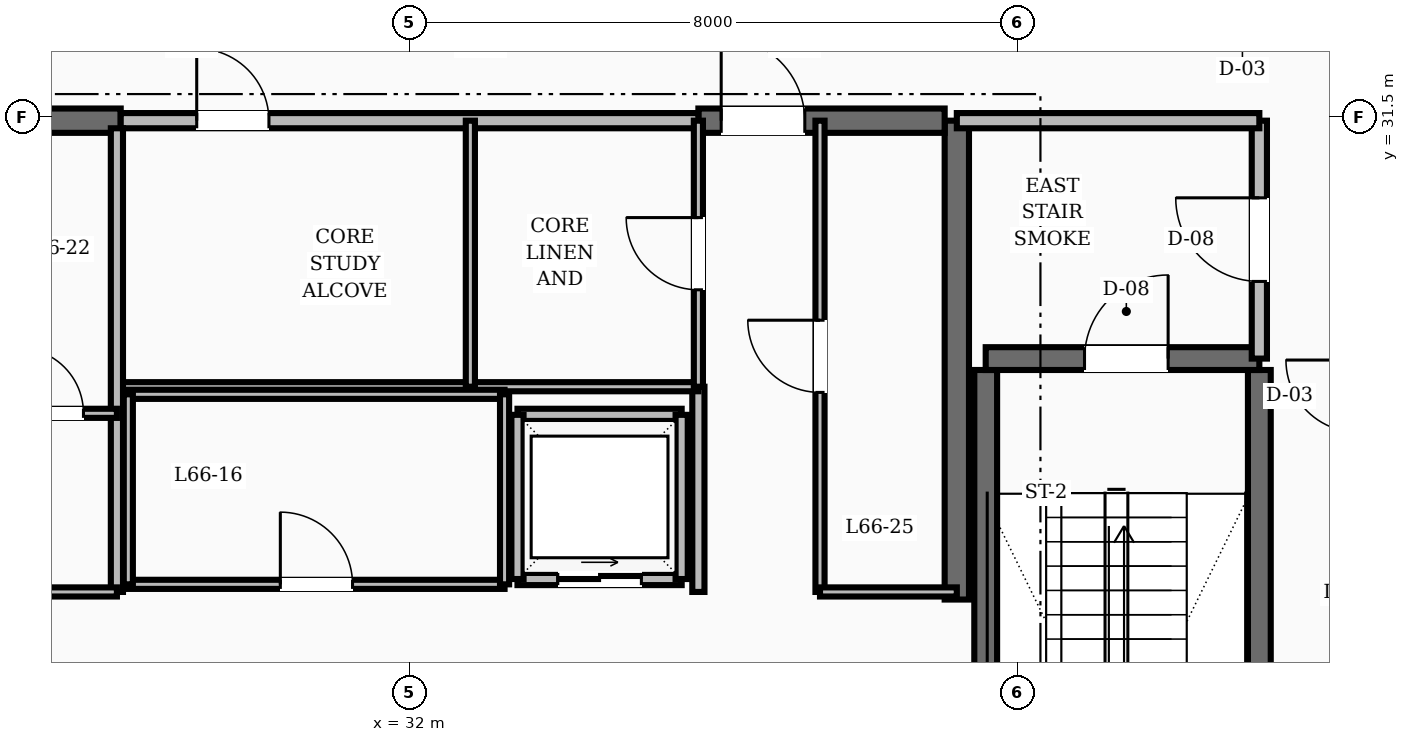
"""IFC4 building model, lengths in metres.
Left out: names, types, materials, properties, quantities, classifications, styles, units other than length and angle.
Written with IfcOpenShell. Run it as: python <this file> out.ifc"""

import sys

from ifc_helpers import new_model, si_unit, direction, frame, frame_2d, origin, place, context, subcontext, project, spatial, rectangle, extrude, element, fill, save


model = new_model("IFC4")
c1 = context("Model", 3, precision=1e-05, world=origin(), true_north=direction((0.0, 1.0)))
c2 = subcontext(c1, "Body", "Model", "MODEL_VIEW")
j1 = project(units=[si_unit("LENGTHUNIT", "METRE"), si_unit("PLANEANGLEUNIT", "RADIAN")], contexts=[c1])
p1 = place(None, origin())
s1 = spatial("IfcSite", under=j1, at=p1, CompositionType="ELEMENT")
p2 = place(p1, origin())
s2 = spatial("IfcBuilding", under=s1, at=p2, CompositionType="ELEMENT")
p3 = place(p2, frame((0.0, 0.0, 254.4)))
s3 = spatial("IfcBuildingStorey", under=s2, at=p3, CompositionType="ELEMENT", Elevation=254.4)
p4 = place(p3, frame((39.2, 25.15, 0.0), z_axis=(0.0, 0.0, 1.0), x_axis=(0.0, 1.0, 0.0)))
e1 = element("IfcWall", 1, at=p4, inside=s3, PredefinedType="SHEAR", context=c2, shape_type="SweptSolid", body=[
    extrude(rectangle(XDim=6.3, YDim=0.32, at=frame_2d((3.15, 0.0))), origin(), (0.0, 0.0, 1.0), 3.6),
])
p5 = place(p3, frame((24.96, 31.45, 0.0), z_axis=(0.0, 0.0, 1.0), x_axis=(1.0, 0.0, 0.0)))
e2 = element("IfcWall", 2, at=p5, inside=s3, PredefinedType="SHEAR", context=c2, shape_type="SweptSolid", body=[
    extrude(rectangle(XDim=3.24, YDim=0.32, at=frame_2d((1.62, 0.0))), origin(), (0.0, 0.0, 1.0), 3.6),
])
p6 = place(p3, frame((35.8, 31.45, 0.0), z_axis=(0.0, 0.0, 1.0), x_axis=(1.0, 0.0, 0.0)))
e3 = element("IfcWall", 3, at=p6, inside=s3, PredefinedType="SHEAR", context=c2, shape_type="SweptSolid", body=[
    extrude(rectangle(XDim=3.24, YDim=0.32, at=frame_2d((1.62, 0.0))), origin(), (0.0, 0.0, 1.0), 3.6),
])
p7 = place(p6, frame((0.3, 0.0, 0.0)))
e4 = element("IfcOpeningElement", 4, at=p7, cuts=e3, PredefinedType="OPENING", context=c2, shape_type="SweptSolid", body=[
    extrude(rectangle(XDim=1.1, YDim=2.1, at=frame_2d((0.55, 1.05))), frame((0.0, 0.17, 0.0), z_axis=(0.0, -1.0, 0.0), x_axis=(1.0, 0.0, 0.0)), (0.0, 0.0, 1.0), 0.34),
])
for number, where, z_axis, x_axis in (
    (5, (43.18, 19.43, 0.0), (0.0, 0.0, 1.0), (0.0, 1.0, 0.0)),
    (6, (39.58, 19.43, 0.0), (0.0, 0.0, 1.0), (0.0, 1.0, 0.0)),
):
    element("IfcWall", number, at=place(p3, frame(where, z_axis=z_axis, x_axis=x_axis)), inside=s3, PredefinedType="SHEAR", context=c2, shape_type="SweptSolid", body=[
        extrude(rectangle(XDim=8.74, YDim=0.3, at=frame_2d((4.37, 0.0))), origin(), (0.0, 0.0, 1.0), 3.6),
    ])
p8 = place(p3, frame((39.58, 28.32, 0.0), z_axis=(0.0, 0.0, 1.0), x_axis=(1.0, 0.0, 0.0)))
e7 = element("IfcWall", 7, at=p8, inside=s3, PredefinedType="SHEAR", context=c2, shape_type="SweptSolid", body=[
    extrude(rectangle(XDim=3.6, YDim=0.3, at=frame_2d((1.8, 0.0))), origin(), (0.0, 0.0, 1.0), 3.6),
])
p9 = place(p8, frame((1.3, 0.0, 0.0)))
e8 = element("IfcOpeningElement", 8, at=p9, cuts=e7, PredefinedType="OPENING", context=c2, shape_type="SweptSolid", body=[
    extrude(rectangle(XDim=1.1, YDim=2.1, at=frame_2d((0.55, 1.05))), frame((0.0, 0.16, 0.0), z_axis=(0.0, -1.0, 0.0), x_axis=(1.0, 0.0, 0.0)), (0.0, 0.0, 1.0), 0.32),
])
p10 = place(p3, frame((43.18, 28.32, 0.0), z_axis=(0.0, 0.0, 1.0), x_axis=(0.0, 1.0, 0.0)))
e9 = element("IfcWall", 9, at=p10, inside=s3, PredefinedType="SOLIDWALL", context=c2, shape_type="SweptSolid", body=[
    extrude(rectangle(XDim=3.13, YDim=0.2, at=frame_2d((1.565, 0.0))), origin(), (0.0, 0.0, 1.0), 2.87),
])
p11 = place(p10, frame((1.015, 0.0, 0.0)))
e10 = element("IfcOpeningElement", 10, at=p11, cuts=e9, PredefinedType="OPENING", context=c2, shape_type="SweptSolid", body=[
    extrude(rectangle(XDim=1.1, YDim=2.1, at=frame_2d((0.55, 1.05))), frame((0.0, 0.11, 0.0), z_axis=(0.0, -1.0, 0.0), x_axis=(1.0, 0.0, 0.0)), (0.0, 0.0, 1.0), 0.22),
])
p12 = place(p3, frame((39.2, 31.45, 0.0), z_axis=(0.0, 0.0, 1.0), x_axis=(1.0, 0.0, 0.0)))
e11 = element("IfcWall", 11, at=p12, inside=s3, PredefinedType="SOLIDWALL", context=c2, shape_type="SweptSolid", body=[
    extrude(rectangle(XDim=3.98, YDim=0.2, at=frame_2d((1.99, 0.0))), origin(), (0.0, 0.0, 1.0), 2.87),
])
p13 = place(p3, frame((35.8, 25.25, 0.0), z_axis=(0.0, 0.0, 1.0), x_axis=(0.0, 1.0, 0.0)))
e12 = element("IfcWall", 12, at=p13, inside=s3, PredefinedType="SOLIDWALL", context=c2, shape_type="SweptSolid", body=[
    extrude(rectangle(XDim=2.7, YDim=0.16, at=frame_2d((1.35, 0.0))), origin(), (0.0, 0.0, 1.0), 2.87),
])
p14 = place(p3, frame((33.42, 25.42, 0.0), z_axis=(0.0, 0.0, 1.0), x_axis=(1.0, 0.0, 0.0)))
e13 = element("IfcWall", 13, at=p14, inside=s3, PredefinedType="SOLIDWALL", context=c2, shape_type="SweptSolid", body=[
    extrude(rectangle(XDim=2.16, YDim=0.16, at=frame_2d((1.08, 0.0))), origin(), (0.0, 0.0, 1.0), 2.87),
])
p15 = place(p14, frame((0.53, 0.0, 0.0)))
e14 = element("IfcOpeningElement", 14, at=p15, cuts=e13, PredefinedType="OPENING", context=c2, shape_type="SweptSolid", body=[
    extrude(rectangle(XDim=1.1, YDim=2.15, at=frame_2d((0.55, 1.075))), frame((0.0, 0.09, 0.0), z_axis=(0.0, -1.0, 0.0), x_axis=(1.0, 0.0, 0.0)), (0.0, 0.0, 1.0), 0.18),
])
for number, where, z_axis, x_axis in (
    (15, (33.42, 27.58, 0.0), (0.0, 0.0, 1.0), (1.0, 0.0, 0.0)),
    (16, (33.42, 25.42, 0.0), (0.0, 0.0, 1.0), (0.0, 1.0, 0.0)),
    (17, (35.58, 25.42, 0.0), (0.0, 0.0, 1.0), (0.0, 1.0, 0.0)),
):
    element("IfcWall", number, at=place(p3, frame(where, z_axis=z_axis, x_axis=x_axis)), inside=s3, PredefinedType="SOLIDWALL", context=c2, shape_type="SweptSolid", body=[
        extrude(rectangle(XDim=2.16, YDim=0.16, at=frame_2d((1.08, 0.0))), origin(), (0.0, 0.0, 1.0), 2.87),
    ])
p16 = place(p3, frame((28.2, 31.45, 0.0), z_axis=(0.0, 0.0, 1.0), x_axis=(1.0, 0.0, 0.0)))
e18 = element("IfcWall", 18, at=p16, inside=s3, PredefinedType="SOLIDWALL", context=c2, shape_type="SweptSolid", body=[
    extrude(rectangle(XDim=7.6, YDim=0.2, at=frame_2d((3.8, 0.0))), origin(), (0.0, 0.0, 1.0), 2.87),
])
p17 = place(p16, frame((1.0, 0.0, 0.0)))
e19 = element("IfcOpeningElement", 19, at=p17, cuts=e18, PredefinedType="OPENING", context=c2, shape_type="SweptSolid", body=[
    extrude(rectangle(XDim=0.95, YDim=2.1, at=frame_2d((0.475, 1.05))), frame((0.0, 0.11, 0.0), z_axis=(0.0, -1.0, 0.0), x_axis=(1.0, 0.0, 0.0)), (0.0, 0.0, 1.0), 0.22),
])
p18 = place(p3, frame((28.2, 27.95, 0.0), z_axis=(0.0, 0.0, 1.0), x_axis=(1.0, 0.0, 0.0)))
e20 = element("IfcWall", 20, at=p18, inside=s3, PredefinedType="PARTITIONING", context=c2, shape_type="SweptSolid", body=[
    extrude(rectangle(XDim=7.6, YDim=0.12, at=frame_2d((3.8, 0.0))), origin(), (0.0, 0.0, 1.0), 2.87),
])
p19 = place(p3, frame((35.8, 27.95, 0.0), z_axis=(0.0, 0.0, 1.0), x_axis=(0.0, 1.0, 0.0)))
e21 = element("IfcWall", 21, at=p19, inside=s3, PredefinedType="PARTITIONING", context=c2, shape_type="SweptSolid", body=[
    extrude(rectangle(XDim=3.5, YDim=0.12, at=frame_2d((1.75, 0.0))), origin(), (0.0, 0.0, 1.0), 2.87),
])
p20 = place(p19, frame((1.275, 0.0, 0.0)))
e22 = element("IfcOpeningElement", 22, at=p20, cuts=e21, PredefinedType="OPENING", context=c2, shape_type="SweptSolid", body=[
    extrude(rectangle(XDim=0.95, YDim=2.1, at=frame_2d((0.475, 1.05))), frame((0.0, 0.07, 0.0), z_axis=(0.0, -1.0, 0.0), x_axis=(1.0, 0.0, 0.0)), (0.0, 0.0, 1.0), 0.14),
])
p21 = place(p3, frame((32.8, 27.95, 0.0), z_axis=(0.0, 0.0, 1.0), x_axis=(0.0, 1.0, 0.0)))
e23 = element("IfcWall", 23, at=p21, inside=s3, PredefinedType="PARTITIONING", context=c2, shape_type="SweptSolid", body=[
    extrude(rectangle(XDim=3.5, YDim=0.12, at=frame_2d((1.75, 0.0))), origin(), (0.0, 0.0, 1.0), 2.87),
])
p22 = place(p3, frame((28.3, 25.35, 0.0), z_axis=(0.0, 0.0, 1.0), x_axis=(1.0, 0.0, 0.0)))
e24 = element("IfcWall", 24, at=p22, inside=s3, PredefinedType="PARTITIONING", context=c2, shape_type="SweptSolid", body=[
    extrude(rectangle(XDim=4.95, YDim=0.12, at=frame_2d((2.475, 0.0))), origin(), (0.0, 0.0, 1.0), 2.87),
])
p23 = place(p22, frame((2.0, 0.0, 0.0)))
e25 = element("IfcOpeningElement", 25, at=p23, cuts=e24, PredefinedType="OPENING", context=c2, shape_type="SweptSolid", body=[
    extrude(rectangle(XDim=0.95, YDim=2.1, at=frame_2d((0.475, 1.05))), frame((0.0, 0.07, 0.0), z_axis=(0.0, -1.0, 0.0), x_axis=(1.0, 0.0, 0.0)), (0.0, 0.0, 1.0), 0.14),
])
p24 = place(p3, frame((28.3, 27.85, 0.0), z_axis=(0.0, 0.0, 1.0), x_axis=(1.0, 0.0, 0.0)))
e26 = element("IfcWall", 26, at=p24, inside=s3, PredefinedType="PARTITIONING", context=c2, shape_type="SweptSolid", body=[
    extrude(rectangle(XDim=4.95, YDim=0.12, at=frame_2d((2.475, 0.0))), origin(), (0.0, 0.0, 1.0), 2.87),
])
for number, where, z_axis, x_axis in (
    (27, (28.3, 25.35, 0.0), (0.0, 0.0, 1.0), (0.0, 1.0, 0.0)),
    (28, (33.25, 25.35, 0.0), (0.0, 0.0, 1.0), (0.0, 1.0, 0.0)),
):
    element("IfcWall", number, at=place(p3, frame(where, z_axis=z_axis, x_axis=x_axis)), inside=s3, PredefinedType="PARTITIONING", context=c2, shape_type="SweptSolid", body=[
        extrude(rectangle(XDim=2.5, YDim=0.12, at=frame_2d((1.25, 0.0))), origin(), (0.0, 0.0, 1.0), 2.87),
    ])
p25 = place(p3, frame((28.15, 25.25, 0.0), z_axis=(0.0, 0.0, 1.0), x_axis=(0.0, 1.0, 0.0)))
e29 = element("IfcWall", 29, at=p25, inside=s3, PredefinedType="SOLIDWALL", context=c2, shape_type="SweptSolid", body=[
    extrude(rectangle(XDim=6.1, YDim=0.16, at=frame_2d((3.05, 0.0))), origin(), (0.0, 0.0, 1.0), 2.87),
])
p26 = place(p3, frame((24.95, 25.25, 0.0), z_axis=(0.0, 0.0, 1.0), x_axis=(1.0, 0.0, 0.0)))
e30 = element("IfcWall", 30, at=p26, inside=s3, PredefinedType="PARTITIONING", context=c2, shape_type="SweptSolid", body=[
    extrude(rectangle(XDim=3.2, YDim=0.12, at=frame_2d((1.6, 0.0))), origin(), (0.0, 0.0, 1.0), 2.87),
])
p27 = place(p26, frame((1.125, 0.0, 0.0)))
e31 = element("IfcOpeningElement", 31, at=p27, cuts=e30, PredefinedType="OPENING", context=c2, shape_type="SweptSolid", body=[
    extrude(rectangle(XDim=0.95, YDim=2.1, at=frame_2d((0.475, 1.05))), frame((0.0, 0.07, 0.0), z_axis=(0.0, -1.0, 0.0), x_axis=(1.0, 0.0, 0.0)), (0.0, 0.0, 1.0), 0.14),
])
p28 = place(p3, frame((37.4, 25.25, 0.0), z_axis=(0.0, 0.0, 1.0), x_axis=(0.0, 1.0, 0.0)))
e32 = element("IfcWall", 32, at=p28, inside=s3, PredefinedType="PARTITIONING", context=c2, shape_type="SweptSolid", body=[
    extrude(rectangle(XDim=6.2, YDim=0.12, at=frame_2d((3.1, 0.0))), origin(), (0.0, 0.0, 1.0), 2.87),
])
p29 = place(p28, frame((2.625, 0.0, 0.0)))
e33 = element("IfcOpeningElement", 33, at=p29, cuts=e32, PredefinedType="OPENING", context=c2, shape_type="SweptSolid", body=[
    extrude(rectangle(XDim=0.95, YDim=2.1, at=frame_2d((0.475, 1.05))), frame((0.0, 0.07, 0.0), z_axis=(0.0, -1.0, 0.0), x_axis=(1.0, 0.0, 0.0)), (0.0, 0.0, 1.0), 0.14),
])
p30 = place(p3, frame((37.4, 25.25, 0.0), z_axis=(0.0, 0.0, 1.0), x_axis=(1.0, 0.0, 0.0)))
e34 = element("IfcWall", 34, at=p30, inside=s3, PredefinedType="PARTITIONING", context=c2, shape_type="SweptSolid", body=[
    extrude(rectangle(XDim=1.8, YDim=0.12, at=frame_2d((0.9, 0.0))), origin(), (0.0, 0.0, 1.0), 2.87),
])
p31 = place(p3, frame((24.95, 27.6, 0.0), z_axis=(0.0, 0.0, 1.0), x_axis=(1.0, 0.0, 0.0)))
e35 = element("IfcWall", 35, at=p31, inside=s3, PredefinedType="PARTITIONING", context=c2, shape_type="SweptSolid", body=[
    extrude(rectangle(XDim=3.2, YDim=0.12, at=frame_2d((1.6, 0.0))), origin(), (0.0, 0.0, 1.0), 2.87),
])
p32 = place(p31, frame((0.44, 0.0, 0.0)))
e36 = element("IfcOpeningElement", 36, at=p32, cuts=e35, PredefinedType="OPENING", context=c2, shape_type="SweptSolid", body=[
    extrude(rectangle(XDim=0.86, YDim=2.1, at=frame_2d((0.43, 1.05))), frame((0.0, 0.07, 0.0), z_axis=(0.0, -1.0, 0.0), x_axis=(1.0, 0.0, 0.0)), (0.0, 0.0, 1.0), 0.14),
])
p33 = place(p31, frame((1.9, 0.0, 0.0)))
e37 = element("IfcOpeningElement", 37, at=p33, cuts=e35, PredefinedType="OPENING", context=c2, shape_type="SweptSolid", body=[
    extrude(rectangle(XDim=0.86, YDim=2.1, at=frame_2d((0.43, 1.05))), frame((0.0, 0.07, 0.0), z_axis=(0.0, -1.0, 0.0), x_axis=(1.0, 0.0, 0.0)), (0.0, 0.0, 1.0), 0.14),
])
p34 = place(p3, frame((44.427, 32.303, 0.0), z_axis=(0.0, 0.0, 1.0), x_axis=(-0.707106781187, 0.707106781187, 0.0)))
e38 = element("IfcWall", 38, at=p34, inside=s3, PredefinedType="SOLIDWALL", context=c2, shape_type="SweptSolid", body=[
    extrude(rectangle(XDim=2.916, YDim=0.16, at=frame_2d((1.458, 0.0))), origin(), (0.0, 0.0, 1.0), 2.87),
])
p35 = place(p34, frame((0.983, 0.0, 0.0)))
e39 = element("IfcOpeningElement", 39, at=p35, cuts=e38, PredefinedType="OPENING", context=c2, shape_type="SweptSolid", body=[
    extrude(rectangle(XDim=0.95, YDim=2.1, at=frame_2d((0.475, 1.05))), frame((0.0, 0.09, 0.0), z_axis=(0.0, -1.0, 0.0), x_axis=(1.0, 0.0, 0.0)), (0.0, 0.0, 1.0), 0.18),
])
p36 = place(p9, origin())
e40 = element("IfcDoor", 40, at=p36, inside=s3, OperationType="SINGLE_SWING_RIGHT", PredefinedType="DOOR", context=c2, shape_type="SweptSolid", body=[
    extrude(rectangle(XDim=1.1, YDim=2.1, at=frame_2d((0.55, 1.05))), frame((0.0, 0.025, 0.0), z_axis=(0.0, -1.0, 0.0), x_axis=(1.0, 0.0, 0.0)), (0.0, 0.0, 1.0), 0.05),
])
fill(e8, e40)
p37 = place(p11, origin())
e41 = element("IfcDoor", 41, at=p37, inside=s3, OperationType="SINGLE_SWING_RIGHT", PredefinedType="DOOR", context=c2, shape_type="SweptSolid", body=[
    extrude(rectangle(XDim=1.1, YDim=2.1, at=frame_2d((0.55, 1.05))), frame((0.0, 0.025, 0.0), z_axis=(0.0, -1.0, 0.0), x_axis=(1.0, 0.0, 0.0)), (0.0, 0.0, 1.0), 0.05),
])
fill(e10, e41)
p38 = place(p7, origin())
e42 = element("IfcDoor", 42, at=p38, inside=s3, OperationType="SINGLE_SWING_LEFT", PredefinedType="DOOR", context=c2, shape_type="SweptSolid", body=[
    extrude(rectangle(XDim=1.1, YDim=2.1, at=frame_2d((0.55, 1.05))), frame((0.0, 0.025, 0.0), z_axis=(0.0, -1.0, 0.0), x_axis=(1.0, 0.0, 0.0)), (0.0, 0.0, 1.0), 0.05),
])
fill(e4, e42)
p39 = place(p15, origin())
e43 = element("IfcDoor", 43, at=p39, inside=s3, OperationType="SLIDING_TO_RIGHT", PredefinedType="DOOR", context=c2, shape_type="SweptSolid", body=[
    extrude(rectangle(XDim=1.1, YDim=2.15, at=frame_2d((0.55, 1.075))), frame((0.0, 0.025, 0.0), z_axis=(0.0, -1.0, 0.0), x_axis=(1.0, 0.0, 0.0)), (0.0, 0.0, 1.0), 0.05),
])
fill(e14, e43)
p40 = place(p17, origin())
e44 = element("IfcDoor", 44, at=p40, inside=s3, OperationType="SINGLE_SWING_LEFT", PredefinedType="DOOR", context=c2, shape_type="SweptSolid", body=[
    extrude(rectangle(XDim=0.95, YDim=2.1, at=frame_2d((0.475, 1.05))), frame((0.0, 0.025, 0.0), z_axis=(0.0, -1.0, 0.0), x_axis=(1.0, 0.0, 0.0)), (0.0, 0.0, 1.0), 0.05),
])
fill(e19, e44)
p41 = place(p20, origin())
e45 = element("IfcDoor", 45, at=p41, inside=s3, OperationType="SINGLE_SWING_RIGHT", PredefinedType="DOOR", context=c2, shape_type="SweptSolid", body=[
    extrude(rectangle(XDim=0.95, YDim=2.1, at=frame_2d((0.475, 1.05))), frame((0.0, 0.025, 0.0), z_axis=(0.0, -1.0, 0.0), x_axis=(1.0, 0.0, 0.0)), (0.0, 0.0, 1.0), 0.05),
])
fill(e22, e45)
p42 = place(p23, origin())
e46 = element("IfcDoor", 46, at=p42, inside=s3, OperationType="SINGLE_SWING_LEFT", PredefinedType="DOOR", context=c2, shape_type="SweptSolid", body=[
    extrude(rectangle(XDim=0.95, YDim=2.1, at=frame_2d((0.475, 1.05))), frame((0.0, 0.025, 0.0), z_axis=(0.0, -1.0, 0.0), x_axis=(1.0, 0.0, 0.0)), (0.0, 0.0, 1.0), 0.05),
])
fill(e25, e46)
p43 = place(p33, origin())
e47 = element("IfcDoor", 47, at=p43, inside=s3, OperationType="SINGLE_SWING_LEFT", PredefinedType="DOOR", context=c2, shape_type="SweptSolid", body=[
    extrude(rectangle(XDim=0.86, YDim=2.1, at=frame_2d((0.43, 1.05))), frame((0.0, 0.025, 0.0), z_axis=(0.0, -1.0, 0.0), x_axis=(1.0, 0.0, 0.0)), (0.0, 0.0, 1.0), 0.05),
])
fill(e37, e47)
p44 = place(p29, origin())
e48 = element("IfcDoor", 48, at=p44, inside=s3, OperationType="SINGLE_SWING_RIGHT", PredefinedType="DOOR", context=c2, shape_type="SweptSolid", body=[
    extrude(rectangle(XDim=0.95, YDim=2.1, at=frame_2d((0.475, 1.05))), frame((0.0, 0.025, 0.0), z_axis=(0.0, -1.0, 0.0), x_axis=(1.0, 0.0, 0.0)), (0.0, 0.0, 1.0), 0.05),
])
fill(e33, e48)
save(model, sys.argv[1])
